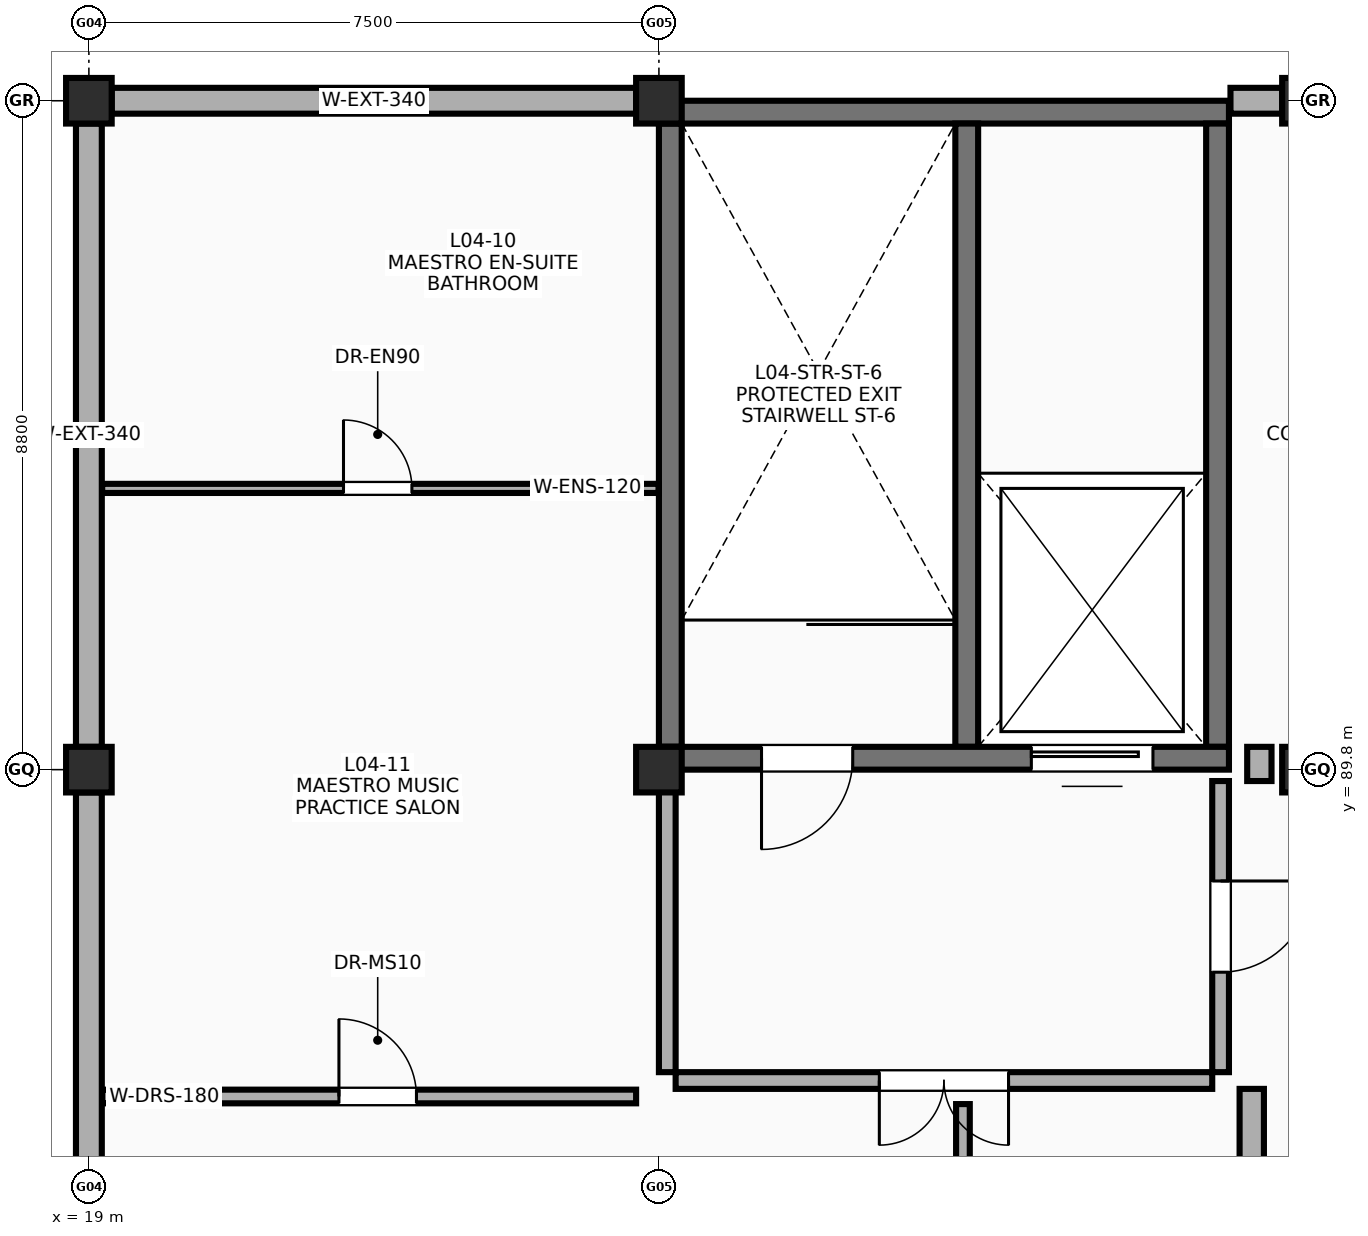
"""IFC4 building model, lengths in metres.
Left out: names, types, materials, properties, quantities, classifications, styles, units other than length and angle.
Written with IfcOpenShell. Run it as: python <this file> out.ifc"""

import sys

from ifc_helpers import new_model, si_unit, direction, frame, frame_2d, origin, origin_2d, place, context, subcontext, project, spatial, rectangle, extrude, element, fill, save


model = new_model("IFC4")
c1 = context("Model", 3, precision=1e-05, world=origin(), true_north=direction((0.0, 1.0)))
c2 = subcontext(c1, "Body", "Model", "MODEL_VIEW")
j1 = project(units=[si_unit("LENGTHUNIT", "METRE"), si_unit("PLANEANGLEUNIT", "RADIAN")], contexts=[c1])
p1 = place(None, origin())
s1 = spatial("IfcSite", under=j1, at=p1, CompositionType="ELEMENT")
p2 = place(p1, origin())
s2 = spatial("IfcBuilding", under=s1, at=p2, CompositionType="ELEMENT")
p3 = place(p2, frame((0.0, 0.0, 18.0)))
s3 = spatial("IfcBuildingStorey", under=s2, at=p3, CompositionType="ELEMENT", Elevation=18.0)
for number, where, z_axis, x_axis in (
    (1, (19.0, 89.8, 0.0), (0.0, 0.0, 1.0), (1.0, 0.0, 0.0)),
    (2, (19.0, 98.6, 0.0), (0.0, 0.0, 1.0), (1.0, 0.0, 0.0)),
    (3, (26.5, 89.8, 0.0), (0.0, 0.0, 1.0), (1.0, 0.0, 0.0)),
    (4, (26.5, 98.6, 0.0), (0.0, 0.0, 1.0), (1.0, 0.0, 0.0)),
    (5, (35.0, 89.8, 0.0), (0.0, 0.0, 1.0), (1.0, 0.0, 0.0)),
    (6, (35.0, 98.6, 0.0), (0.0, 0.0, 1.0), (1.0, 0.0, 0.0)),
):
    element("IfcColumn", number, at=place(p3, frame(where, z_axis=z_axis, x_axis=x_axis)), inside=s3, PredefinedType="COLUMN", context=c2, shape_type="SweptSolid", body=[
        extrude(rectangle(XDim=0.6, YDim=0.6, at=origin_2d()), origin(), (0.0, 0.0, 1.0), 5.4),
    ])
p4 = place(p3, frame((26.5, 98.45, 0.0), z_axis=(0.0, 0.0, 1.0), x_axis=(1.0, 0.0, 0.0)))
e7 = element("IfcWall", 7, at=p4, inside=s3, PredefinedType="SHEAR", context=c2, shape_type="SweptSolid", body=[
    extrude(rectangle(XDim=7.5, YDim=0.3, at=frame_2d((3.75, 0.0))), origin(), (0.0, 0.0, 1.0), 5.4),
])
for number, where, z_axis, x_axis in (
    (8, (26.65, 90.1, 0.0), (0.0, 0.0, 1.0), (0.0, 1.0, 0.0)),
    (9, (33.85, 90.1, 0.0), (0.0, 0.0, 1.0), (0.0, 1.0, 0.0)),
    (10, (30.55, 90.1, 0.0), (0.0, 0.0, 1.0), (0.0, 1.0, 0.0)),
):
    element("IfcWall", number, at=place(p3, frame(where, z_axis=z_axis, x_axis=x_axis)), inside=s3, PredefinedType="SHEAR", context=c2, shape_type="SweptSolid", body=[
        extrude(rectangle(XDim=8.2, YDim=0.3, at=frame_2d((4.1, 0.0))), origin(), (0.0, 0.0, 1.0), 5.4),
    ])
p5 = place(p3, frame((19.3, 98.6, 0.0), z_axis=(0.0, 0.0, 1.0), x_axis=(1.0, 0.0, 0.0)))
e11 = element("IfcWall", 11, at=p5, inside=s3, PredefinedType="SOLIDWALL", context=c2, shape_type="SweptSolid", body=[
    extrude(rectangle(XDim=6.9, YDim=0.34, at=frame_2d((3.45, 0.0))), origin(), (0.0, 0.0, 1.0), 3.85),
])
p6 = place(p3, frame((19.0, 81.5, 0.0), z_axis=(0.0, 0.0, 1.0), x_axis=(0.0, 1.0, 0.0)))
e12 = element("IfcWall", 12, at=p6, inside=s3, PredefinedType="SOLIDWALL", context=c2, shape_type="SweptSolid", body=[
    extrude(rectangle(XDim=8.0, YDim=0.34, at=frame_2d((4.0, 0.0))), origin(), (0.0, 0.0, 1.0), 3.85),
])
p7 = place(p3, frame((19.0, 90.1, 0.0), z_axis=(0.0, 0.0, 1.0), x_axis=(0.0, 1.0, 0.0)))
e13 = element("IfcWall", 13, at=p7, inside=s3, PredefinedType="SOLIDWALL", context=c2, shape_type="SweptSolid", body=[
    extrude(rectangle(XDim=8.2, YDim=0.34, at=frame_2d((4.1, 0.0))), origin(), (0.0, 0.0, 1.0), 3.85),
])
p8 = place(p3, frame((26.5, 89.95, 0.0), z_axis=(0.0, 0.0, 1.0), x_axis=(1.0, 0.0, 0.0)))
e14 = element("IfcWall", 14, at=p8, inside=s3, PredefinedType="SHEAR", context=c2, shape_type="SweptSolid", body=[
    extrude(rectangle(XDim=7.5, YDim=0.3, at=frame_2d((3.75, 0.0))), origin(), (0.0, 0.0, 1.0), 5.4),
])
p9 = place(p8, frame((2.55, 0.0, 0.0), z_axis=(0.0, 0.0, 1.0), x_axis=(-1.0, 0.0, 0.0)))
e15 = element("IfcOpeningElement", 15, at=p9, cuts=e14, PredefinedType="OPENING", context=c2, shape_type="SweptSolid", body=[
    extrude(rectangle(XDim=1.2, YDim=2.15, at=frame_2d((0.6, 1.075))), frame((0.0, 0.16, 0.0), z_axis=(0.0, -1.0, 0.0), x_axis=(1.0, 0.0, 0.0)), (0.0, 0.0, 1.0), 0.32),
])
p10 = place(p8, frame((4.9, 0.0, 0.0)))
e16 = element("IfcOpeningElement", 16, at=p10, cuts=e14, PredefinedType="OPENING", context=c2, shape_type="SweptSolid", body=[
    extrude(rectangle(XDim=1.6, YDim=2.25, at=frame_2d((0.8, 1.125))), frame((0.0, 0.16, 0.0), z_axis=(0.0, -1.0, 0.0), x_axis=(1.0, 0.0, 0.0)), (0.0, 0.0, 1.0), 0.32),
])
p11 = place(p3, frame((26.72, 85.71, 0.0), z_axis=(0.0, 0.0, 1.0), x_axis=(1.0, 0.0, 0.0)))
e17 = element("IfcWall", 17, at=p11, inside=s3, PredefinedType="SOLIDWALL", context=c2, shape_type="SweptSolid", body=[
    extrude(rectangle(XDim=7.06, YDim=0.22, at=frame_2d((3.53, 0.0))), origin(), (0.0, 0.0, 1.0), 4.33),
])
p12 = place(p11, frame((4.38, 0.0, 0.0), z_axis=(0.0, 0.0, 1.0), x_axis=(-1.0, 0.0, 0.0)))
e18 = element("IfcOpeningElement", 18, at=p12, cuts=e17, PredefinedType="OPENING", context=c2, shape_type="SweptSolid", body=[
    extrude(rectangle(XDim=1.7, YDim=2.18, at=frame_2d((0.85, 1.09))), frame((0.0, 0.12, 0.0), z_axis=(0.0, -1.0, 0.0), x_axis=(1.0, 0.0, 0.0)), (0.0, 0.0, 1.0), 0.24),
])
p13 = place(p3, frame((26.61, 85.82, 0.0), z_axis=(0.0, 0.0, 1.0), x_axis=(0.0, 1.0, 0.0)))
e19 = element("IfcWall", 19, at=p13, inside=s3, PredefinedType="SOLIDWALL", context=c2, shape_type="SweptSolid", body=[
    extrude(rectangle(XDim=3.83, YDim=0.22, at=frame_2d((1.915, 0.0))), origin(), (0.0, 0.0, 1.0), 4.33),
])
p14 = place(p3, frame((33.89, 85.82, 0.0), z_axis=(0.0, 0.0, 1.0), x_axis=(0.0, 1.0, 0.0)))
e20 = element("IfcWall", 20, at=p14, inside=s3, PredefinedType="SOLIDWALL", context=c2, shape_type="SweptSolid", body=[
    extrude(rectangle(XDim=3.83, YDim=0.22, at=frame_2d((1.915, 0.0))), origin(), (0.0, 0.0, 1.0), 4.33),
])
p15 = place(p14, frame((2.515, 0.0, 0.0), z_axis=(0.0, 0.0, 1.0), x_axis=(-1.0, 0.0, 0.0)))
e21 = element("IfcOpeningElement", 21, at=p15, cuts=e20, PredefinedType="OPENING", context=c2, shape_type="SweptSolid", body=[
    extrude(rectangle(XDim=1.2, YDim=2.15, at=frame_2d((0.6, 1.075))), frame((0.0, 0.12, 0.0), z_axis=(0.0, -1.0, 0.0), x_axis=(1.0, 0.0, 0.0)), (0.0, 0.0, 1.0), 0.24),
])
p16 = place(p3, frame((34.3, 72.775, 0.0), z_axis=(0.0, 0.0, 1.0), x_axis=(0.0, 1.0, 0.0)))
e22 = element("IfcWall", 22, at=p16, inside=s3, PredefinedType="PARTITIONING", context=c2, shape_type="SweptSolid", body=[
    extrude(rectangle(XDim=12.825, YDim=0.32, at=frame_2d((6.413, 0.0))), origin(), (0.0, 0.0, 1.0), 4.3),
])
p17 = place(p16, frame((6.025, 0.0, 0.0)))
e23 = element("IfcOpeningElement", 23, at=p17, cuts=e22, PredefinedType="OPENING", context=c2, shape_type="SweptSolid", body=[
    extrude(rectangle(XDim=1.0, YDim=2.2, at=frame_2d((0.5, 1.1))), frame((0.0, 0.17, 0.0), z_axis=(0.0, -1.0, 0.0), x_axis=(1.0, 0.0, 0.0)), (0.0, 0.0, 1.0), 0.34),
])
p18 = place(p3, frame((19.175, 85.5, 0.0), z_axis=(0.0, 0.0, 1.0), x_axis=(1.0, 0.0, 0.0)))
e24 = element("IfcWall", 24, at=p18, inside=s3, PredefinedType="PARTITIONING", context=c2, shape_type="SweptSolid", body=[
    extrude(rectangle(XDim=7.025, YDim=0.18, at=frame_2d((3.512, 0.0))), origin(), (0.0, 0.0, 1.0), 4.3),
])
p19 = place(p18, frame((3.115, 0.0, 0.0)))
e25 = element("IfcOpeningElement", 25, at=p19, cuts=e24, PredefinedType="OPENING", context=c2, shape_type="SweptSolid", body=[
    extrude(rectangle(XDim=1.02, YDim=2.2, at=frame_2d((0.51, 1.1))), frame((0.0, 0.1, 0.0), z_axis=(0.0, -1.0, 0.0), x_axis=(1.0, 0.0, 0.0)), (0.0, 0.0, 1.0), 0.2),
])
p20 = place(p3, frame((30.5, 72.775, 0.0), z_axis=(0.0, 0.0, 1.0), x_axis=(0.0, 1.0, 0.0)))
e26 = element("IfcWall", 26, at=p20, inside=s3, PredefinedType="PARTITIONING", context=c2, shape_type="SweptSolid", body=[
    extrude(rectangle(XDim=12.625, YDim=0.18, at=frame_2d((6.312, 0.0))), origin(), (0.0, 0.0, 1.0), 4.3),
])
p21 = place(p20, frame((5.915, 0.0, 0.0)))
e27 = element("IfcOpeningElement", 27, at=p21, cuts=e26, PredefinedType="OPENING", context=c2, shape_type="SweptSolid", body=[
    extrude(rectangle(XDim=1.02, YDim=2.2, at=frame_2d((0.51, 1.1))), frame((0.0, 0.1, 0.0), z_axis=(0.0, -1.0, 0.0), x_axis=(1.0, 0.0, 0.0)), (0.0, 0.0, 1.0), 0.2),
])
p22 = place(p3, frame((19.175, 93.5, 0.0), z_axis=(0.0, 0.0, 1.0), x_axis=(1.0, 0.0, 0.0)))
e28 = element("IfcWall", 28, at=p22, inside=s3, PredefinedType="PARTITIONING", context=c2, shape_type="SweptSolid", body=[
    extrude(rectangle(XDim=7.32, YDim=0.12, at=frame_2d((3.66, 0.0))), origin(), (0.0, 0.0, 1.0), 4.3),
])
p23 = place(p22, frame((3.175, 0.0, 0.0)))
e29 = element("IfcOpeningElement", 29, at=p23, cuts=e28, PredefinedType="OPENING", context=c2, shape_type="SweptSolid", body=[
    extrude(rectangle(XDim=0.9, YDim=2.15, at=frame_2d((0.45, 1.075))), frame((0.0, 0.07, 0.0), z_axis=(0.0, -1.0, 0.0), x_axis=(1.0, 0.0, 0.0)), (0.0, 0.0, 1.0), 0.14),
])
p24 = place(p3, frame((34.4, 89.65, 0.0), z_axis=(0.0, 0.0, 1.0), x_axis=(0.0, 1.0, 0.0)))
e30 = element("IfcWall", 30, at=p24, inside=s3, PredefinedType="PARTITIONING", context=c2, shape_type="SweptSolid", body=[
    extrude(rectangle(XDim=0.45, YDim=0.32, at=frame_2d((0.225, 0.0))), origin(), (0.0, 0.0, 1.0), 4.33),
])
p25 = place(p3, frame((34.02, 98.6, 0.0), z_axis=(0.0, 0.0, 1.0), x_axis=(1.0, 0.0, 0.0)))
e31 = element("IfcWall", 31, at=p25, inside=s3, PredefinedType="SOLIDWALL", context=c2, shape_type="SweptSolid", body=[
    extrude(rectangle(XDim=0.68, YDim=0.34, at=frame_2d((0.34, 0.0))), origin(), (0.0, 0.0, 1.0), 3.85),
])
p26 = place(p9, origin())
e32 = element("IfcDoor", 32, at=p26, inside=s3, OperationType="SINGLE_SWING_RIGHT", PredefinedType="DOOR", context=c2, shape_type="SweptSolid", body=[
    extrude(rectangle(XDim=1.2, YDim=2.15, at=frame_2d((0.6, 1.075))), frame((0.0, 0.025, 0.0), z_axis=(0.0, -1.0, 0.0), x_axis=(1.0, 0.0, 0.0)), (0.0, 0.0, 1.0), 0.05),
])
fill(e15, e32)
p27 = place(p10, origin())
e33 = element("IfcDoor", 33, at=p27, inside=s3, OperationType="SLIDING_TO_LEFT", PredefinedType="DOOR", context=c2, shape_type="SweptSolid", body=[
    extrude(rectangle(XDim=1.6, YDim=2.25, at=frame_2d((0.8, 1.125))), frame((0.0, 0.025, 0.0), z_axis=(0.0, -1.0, 0.0), x_axis=(1.0, 0.0, 0.0)), (0.0, 0.0, 1.0), 0.05),
])
fill(e16, e33)
p28 = place(p12, origin())
e34 = element("IfcDoor", 34, at=p28, inside=s3, OperationType="DOUBLE_DOOR_SINGLE_SWING", PredefinedType="DOOR", context=c2, shape_type="SweptSolid", body=[
    extrude(rectangle(XDim=1.7, YDim=2.18, at=frame_2d((0.85, 1.09))), frame((0.0, 0.025, 0.0), z_axis=(0.0, -1.0, 0.0), x_axis=(1.0, 0.0, 0.0)), (0.0, 0.0, 1.0), 0.05),
])
fill(e18, e34)
p29 = place(p15, origin())
e35 = element("IfcDoor", 35, at=p29, inside=s3, OperationType="SINGLE_SWING_LEFT", PredefinedType="DOOR", context=c2, shape_type="SweptSolid", body=[
    extrude(rectangle(XDim=1.2, YDim=2.15, at=frame_2d((0.6, 1.075))), frame((0.0, 0.025, 0.0), z_axis=(0.0, -1.0, 0.0), x_axis=(1.0, 0.0, 0.0)), (0.0, 0.0, 1.0), 0.05),
])
fill(e21, e35)
p30 = place(p19, origin())
e36 = element("IfcDoor", 36, at=p30, inside=s3, OperationType="SINGLE_SWING_LEFT", PredefinedType="DOOR", context=c2, shape_type="SweptSolid", body=[
    extrude(rectangle(XDim=1.02, YDim=2.2, at=frame_2d((0.51, 1.1))), frame((0.0, 0.025, 0.0), z_axis=(0.0, -1.0, 0.0), x_axis=(1.0, 0.0, 0.0)), (0.0, 0.0, 1.0), 0.05),
])
fill(e25, e36)
p31 = place(p23, origin())
e37 = element("IfcDoor", 37, at=p31, inside=s3, OperationType="SINGLE_SWING_LEFT", PredefinedType="DOOR", context=c2, shape_type="SweptSolid", body=[
    extrude(rectangle(XDim=0.9, YDim=2.15, at=frame_2d((0.45, 1.075))), frame((0.0, 0.025, 0.0), z_axis=(0.0, -1.0, 0.0), x_axis=(1.0, 0.0, 0.0)), (0.0, 0.0, 1.0), 0.05),
])
fill(e29, e37)
save(model, sys.argv[1])
